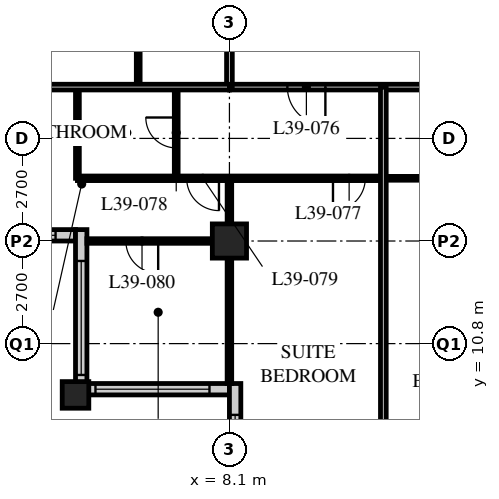
"""IFC4 building model, lengths in metres.
Left out: names, types, materials, properties, quantities, classifications, styles, units other than length and angle.
Written with IfcOpenShell. Run it as: python <this file> out.ifc"""

import sys

from ifc_helpers import new_model, si_unit, direction, frame, frame_2d, origin, origin_2d, place, context, subcontext, project, spatial, rectangle, hollow_rectangle, extrude, element, fill, save


model = new_model("IFC4")
c1 = context("Model", 3, precision=1e-05, world=origin(), true_north=direction((0.0, 1.0)))
c2 = subcontext(c1, "Body", "Model", "MODEL_VIEW")
j1 = project(units=[si_unit("LENGTHUNIT", "METRE"), si_unit("PLANEANGLEUNIT", "RADIAN")], contexts=[c1])
p1 = place(None, origin())
s1 = spatial("IfcSite", under=j1, at=p1, CompositionType="ELEMENT")
p2 = place(p1, origin())
s2 = spatial("IfcBuilding", under=s1, at=p2, CompositionType="ELEMENT")
p3 = place(p2, frame((0.0, 0.0, 151.0)))
s3 = spatial("IfcBuildingStorey", under=s2, at=p3, CompositionType="ELEMENT", Elevation=151.0)
p4 = place(p3, frame((4.05, 9.45, 0.0), z_axis=(0.0, 0.0, 1.0), x_axis=(1.0, 0.0, 0.0)))
e1 = element("IfcColumn", 1, at=p4, inside=s3, PredefinedType="COLUMN", context=c2, shape_type="SweptSolid", body=[
    extrude(hollow_rectangle(XDim=0.7, YDim=0.7, WallThickness=0.07, at=origin_2d()), origin(), (0.0, 0.0, 1.0), 3.4),
])
p5 = place(p3, frame((8.1, 13.5, 0.0), z_axis=(0.0, 0.0, 1.0), x_axis=(1.0, 0.0, 0.0)))
e2 = element("IfcColumn", 2, at=p5, inside=s3, PredefinedType="COLUMN", context=c2, shape_type="SweptSolid", body=[
    extrude(hollow_rectangle(XDim=0.9, YDim=0.9, WallThickness=0.1, at=origin_2d()), origin(), (0.0, 0.0, 1.0), 3.4),
])
p6 = place(p3, frame((0.3, 13.65, 0.0), z_axis=(0.0, 0.0, 1.0), x_axis=(1.0, 0.0, 0.0)))
e3 = element("IfcWall", 3, at=p6, inside=s3, PredefinedType="SOLIDWALL", context=c2, shape_type="SweptSolid", body=[
    extrude(rectangle(XDim=3.75, YDim=0.3, at=frame_2d((1.875, 0.0))), origin(), (0.0, 0.0, 1.0), 3.19),
])
p7 = place(p6, frame((0.225, 0.0, 0.9)))
e4 = element("IfcOpeningElement", 4, at=p7, cuts=e3, PredefinedType="OPENING", context=c2, shape_type="SweptSolid", body=[
    extrude(rectangle(XDim=3.0, YDim=1.4, at=frame_2d((1.5, 0.7))), frame((0.0, 0.16, 0.0), z_axis=(0.0, -1.0, 0.0), x_axis=(1.0, 0.0, 0.0)), (0.0, 0.0, 1.0), 0.32),
])
p8 = place(p3, frame((4.2, 13.8, 0.0), z_axis=(0.0, 0.0, 1.0), x_axis=(0.0, -1.0, 0.0)))
e5 = element("IfcWall", 5, at=p8, inside=s3, PredefinedType="SOLIDWALL", context=c2, shape_type="SweptSolid", body=[
    extrude(rectangle(XDim=4.35, YDim=0.3, at=frame_2d((2.175, 0.0))), origin(), (0.0, 0.0, 1.0), 3.19),
])
p9 = place(p8, frame((0.825, 0.0, 0.9)))
e6 = element("IfcOpeningElement", 6, at=p9, cuts=e5, PredefinedType="OPENING", context=c2, shape_type="SweptSolid", body=[
    extrude(rectangle(XDim=3.0, YDim=1.4, at=frame_2d((1.5, 0.7))), frame((0.0, 0.16, 0.0), z_axis=(0.0, -1.0, 0.0), x_axis=(1.0, 0.0, 0.0)), (0.0, 0.0, 1.0), 0.32),
])
p10 = place(p3, frame((4.35, 9.6, 0.0), z_axis=(0.0, 0.0, 1.0), x_axis=(1.0, 0.0, 0.0)))
e7 = element("IfcWall", 7, at=p10, inside=s3, PredefinedType="SOLIDWALL", context=c2, shape_type="SweptSolid", body=[
    extrude(rectangle(XDim=3.75, YDim=0.3, at=frame_2d((1.875, 0.0))), origin(), (0.0, 0.0, 1.0), 3.19),
])
p11 = place(p10, frame((0.225, 0.0, 0.9)))
e8 = element("IfcOpeningElement", 8, at=p11, cuts=e7, PredefinedType="OPENING", context=c2, shape_type="SweptSolid", body=[
    extrude(rectangle(XDim=3.0, YDim=1.4, at=frame_2d((1.5, 0.7))), frame((0.0, 0.16, 0.0), z_axis=(0.0, -1.0, 0.0), x_axis=(1.0, 0.0, 0.0)), (0.0, 0.0, 1.0), 0.32),
])
p12 = place(p3, frame((8.25, 9.75, 0.0), z_axis=(0.0, 0.0, 1.0), x_axis=(0.0, -1.0, 0.0)))
e9 = element("IfcWall", 9, at=p12, inside=s3, PredefinedType="SOLIDWALL", context=c2, shape_type="SweptSolid", body=[
    extrude(rectangle(XDim=4.35, YDim=0.3, at=frame_2d((2.175, 0.0))), origin(), (0.0, 0.0, 1.0), 3.19),
])
p13 = place(p12, frame((0.825, 0.0, 0.9)))
e10 = element("IfcOpeningElement", 10, at=p13, cuts=e9, PredefinedType="OPENING", context=c2, shape_type="SweptSolid", body=[
    extrude(rectangle(XDim=3.0, YDim=1.4, at=frame_2d((1.5, 0.7))), frame((0.0, 0.16, 0.0), z_axis=(0.0, -1.0, 0.0), x_axis=(1.0, 0.0, 0.0)), (0.0, 0.0, 1.0), 0.32),
])
p14 = place(p3, frame((8.1, 17.55, 0.0), z_axis=(0.0, 0.0, 1.0), x_axis=(1.0, 0.0, 0.0)))
e11 = element("IfcWall", 11, at=p14, inside=s3, PredefinedType="PARTITIONING", context=c2, shape_type="SweptSolid", body=[
    extrude(rectangle(XDim=40.5, YDim=0.15, at=frame_2d((20.25, 0.0))), origin(), (0.0, 0.0, 1.0), 3.19),
])
p15 = place(p14, frame((10.0, 0.0, 0.0)))
e12 = element("IfcOpeningElement", 12, at=p15, cuts=e11, PredefinedType="OPENING", context=c2, shape_type="SweptSolid", body=[
    extrude(rectangle(XDim=1.0, YDim=2.1, at=frame_2d((0.5, 1.05))), frame((0.0, 0.085, 0.0), z_axis=(0.0, -1.0, 0.0), x_axis=(1.0, 0.0, 0.0)), (0.0, 0.0, 1.0), 0.17),
])
p16 = place(p14, frame((22.15, 0.0, 0.0)))
e13 = element("IfcOpeningElement", 13, at=p16, cuts=e11, PredefinedType="OPENING", context=c2, shape_type="SweptSolid", body=[
    extrude(rectangle(XDim=1.0, YDim=2.1, at=frame_2d((0.5, 1.05))), frame((0.0, 0.085, 0.0), z_axis=(0.0, -1.0, 0.0), x_axis=(1.0, 0.0, 0.0)), (0.0, 0.0, 1.0), 0.17),
])
p17 = place(p14, frame((30.8, 0.0, 0.0)))
e14 = element("IfcOpeningElement", 14, at=p17, cuts=e11, PredefinedType="OPENING", context=c2, shape_type="SweptSolid", body=[
    extrude(rectangle(XDim=1.0, YDim=2.1, at=frame_2d((0.5, 1.05))), frame((0.0, 0.085, 0.0), z_axis=(0.0, -1.0, 0.0), x_axis=(1.0, 0.0, 0.0)), (0.0, 0.0, 1.0), 0.17),
])
p18 = place(p14, frame((34.85, 0.0, 0.0)))
e15 = element("IfcOpeningElement", 15, at=p18, cuts=e11, PredefinedType="OPENING", context=c2, shape_type="SweptSolid", body=[
    extrude(rectangle(XDim=1.0, YDim=2.1, at=frame_2d((0.5, 1.05))), frame((0.0, 0.085, 0.0), z_axis=(0.0, -1.0, 0.0), x_axis=(1.0, 0.0, 0.0)), (0.0, 0.0, 1.0), 0.17),
])
p19 = place(p14, frame((1.525, 0.0, 0.0)))
e16 = element("IfcOpeningElement", 16, at=p19, cuts=e11, PredefinedType="OPENING", context=c2, shape_type="SweptSolid", body=[
    extrude(rectangle(XDim=1.0, YDim=2.1, at=frame_2d((0.5, 1.05))), frame((0.0, 0.085, 0.0), z_axis=(0.0, -1.0, 0.0), x_axis=(1.0, 0.0, 0.0)), (0.0, 0.0, 1.0), 0.17),
])
p20 = place(p14, frame((37.975, 0.0, 0.0)))
e17 = element("IfcOpeningElement", 17, at=p20, cuts=e11, PredefinedType="OPENING", context=c2, shape_type="SweptSolid", body=[
    extrude(rectangle(XDim=1.0, YDim=2.1, at=frame_2d((0.5, 1.05))), frame((0.0, 0.085, 0.0), z_axis=(0.0, -1.0, 0.0), x_axis=(1.0, 0.0, 0.0)), (0.0, 0.0, 1.0), 0.17),
])
p21 = place(p3, frame((8.1, 17.55, 0.0), z_axis=(0.0, 0.0, 1.0), x_axis=(0.0, 1.0, 0.0)))
e18 = element("IfcWall", 18, at=p21, inside=s3, PredefinedType="PARTITIONING", context=c2, shape_type="SweptSolid", body=[
    extrude(rectangle(XDim=28.35, YDim=0.15, at=frame_2d((14.175, 0.0))), origin(), (0.0, 0.0, 1.0), 2.42),
])
p22 = place(p21, frame((5.95, 0.0, 0.0)))
e19 = element("IfcOpeningElement", 19, at=p22, cuts=e18, PredefinedType="OPENING", context=c2, shape_type="SweptSolid", body=[
    extrude(rectangle(XDim=1.0, YDim=2.1, at=frame_2d((0.5, 1.05))), frame((0.0, 0.085, 0.0), z_axis=(0.0, -1.0, 0.0), x_axis=(1.0, 0.0, 0.0)), (0.0, 0.0, 1.0), 0.17),
])
p23 = place(p21, frame((16.8, 0.0, 0.0)))
e20 = element("IfcOpeningElement", 20, at=p23, cuts=e18, PredefinedType="OPENING", context=c2, shape_type="SweptSolid", body=[
    extrude(rectangle(XDim=1.0, YDim=2.1, at=frame_2d((0.5, 1.05))), frame((0.0, 0.085, 0.0), z_axis=(0.0, -1.0, 0.0), x_axis=(1.0, 0.0, 0.0)), (0.0, 0.0, 1.0), 0.17),
])
p24 = place(p21, frame((22.7, 0.0, 0.0)))
e21 = element("IfcOpeningElement", 21, at=p24, cuts=e18, PredefinedType="OPENING", context=c2, shape_type="SweptSolid", body=[
    extrude(rectangle(XDim=1.0, YDim=2.1, at=frame_2d((0.5, 1.05))), frame((0.0, 0.085, 0.0), z_axis=(0.0, -1.0, 0.0), x_axis=(1.0, 0.0, 0.0)), (0.0, 0.0, 1.0), 0.17),
])
p25 = place(p21, frame((24.9, 0.0, 0.0)))
e22 = element("IfcOpeningElement", 22, at=p25, cuts=e18, PredefinedType="OPENING", context=c2, shape_type="SweptSolid", body=[
    extrude(rectangle(XDim=1.0, YDim=2.1, at=frame_2d((0.5, 1.05))), frame((0.0, 0.085, 0.0), z_axis=(0.0, -1.0, 0.0), x_axis=(1.0, 0.0, 0.0)), (0.0, 0.0, 1.0), 0.17),
])
p26 = place(p3, frame((12.15, 15.15, 0.0), z_axis=(0.0, 0.0, 1.0), x_axis=(1.0, 0.0, 0.0)))
e23 = element("IfcWall", 23, at=p26, inside=s3, PredefinedType="PARTITIONING", context=c2, shape_type="SweptSolid", body=[
    extrude(rectangle(XDim=2.6, YDim=0.1, at=frame_2d((1.3, 0.0))), origin(), (0.0, 0.0, 1.0), 3.19),
])
p27 = place(p3, frame((5.7, 17.55, 0.0), z_axis=(0.0, 0.0, 1.0), x_axis=(0.0, 1.0, 0.0)))
e24 = element("IfcWall", 24, at=p27, inside=s3, PredefinedType="PARTITIONING", context=c2, shape_type="SweptSolid", body=[
    extrude(rectangle(XDim=2.6, YDim=0.1, at=frame_2d((1.3, 0.0))), origin(), (0.0, 0.0, 1.0), 3.19),
])
p28 = place(p3, frame((6.7, 17.55, 0.0), z_axis=(0.0, 0.0, 1.0), x_axis=(0.0, -1.0, 0.0)))
e25 = element("IfcWall", 25, at=p28, inside=s3, PredefinedType="PARTITIONING", context=c2, shape_type="SweptSolid", body=[
    extrude(rectangle(XDim=2.4, YDim=0.1, at=frame_2d((1.2, 0.0))), origin(), (0.0, 0.0, 1.0), 3.19),
])
p29 = place(p28, frame((0.8, 0.0, 0.0)))
e26 = element("IfcOpeningElement", 26, at=p29, cuts=e25, PredefinedType="OPENING", context=c2, shape_type="SweptSolid", body=[
    extrude(rectangle(XDim=0.8, YDim=2.1, at=frame_2d((0.4, 1.05))), frame((0.0, 0.06, 0.0), z_axis=(0.0, -1.0, 0.0), x_axis=(1.0, 0.0, 0.0)), (0.0, 0.0, 1.0), 0.12),
])
p30 = place(p3, frame((4.1, 17.55, 0.0), z_axis=(0.0, 0.0, 1.0), x_axis=(0.0, -1.0, 0.0)))
e27 = element("IfcWall", 27, at=p30, inside=s3, PredefinedType="PARTITIONING", context=c2, shape_type="SweptSolid", body=[
    extrude(rectangle(XDim=2.4, YDim=0.1, at=frame_2d((1.2, 0.0))), origin(), (0.0, 0.0, 1.0), 3.19),
])
p31 = place(p3, frame((4.1, 15.15, 0.0), z_axis=(0.0, 0.0, 1.0), x_axis=(1.0, 0.0, 0.0)))
e28 = element("IfcWall", 28, at=p31, inside=s3, PredefinedType="PARTITIONING", context=c2, shape_type="SweptSolid", body=[
    extrude(rectangle(XDim=8.05, YDim=0.12, at=frame_2d((4.025, 0.0))), origin(), (0.0, 0.0, 1.0), 3.19),
])
p32 = place(p31, frame((6.725, 0.0, 0.0)))
e29 = element("IfcOpeningElement", 29, at=p32, cuts=e28, PredefinedType="OPENING", context=c2, shape_type="SweptSolid", body=[
    extrude(rectangle(XDim=0.85, YDim=2.1, at=frame_2d((0.425, 1.05))), frame((0.0, 0.07, 0.0), z_axis=(0.0, -1.0, 0.0), x_axis=(1.0, 0.0, 0.0)), (0.0, 0.0, 1.0), 0.14),
])
p33 = place(p31, frame((2.875, 0.0, 0.0)))
e30 = element("IfcOpeningElement", 30, at=p33, cuts=e28, PredefinedType="OPENING", context=c2, shape_type="SweptSolid", body=[
    extrude(rectangle(XDim=0.85, YDim=2.1, at=frame_2d((0.425, 1.05))), frame((0.0, 0.07, 0.0), z_axis=(0.0, -1.0, 0.0), x_axis=(1.0, 0.0, 0.0)), (0.0, 0.0, 1.0), 0.14),
])
p34 = place(p3, frame((8.1, 15.15, 0.0), z_axis=(0.0, 0.0, 1.0), x_axis=(0.0, -1.0, 0.0)))
e31 = element("IfcWall", 31, at=p34, inside=s3, PredefinedType="PARTITIONING", context=c2, shape_type="SweptSolid", body=[
    extrude(rectangle(XDim=5.4, YDim=0.12, at=frame_2d((2.7, 0.0))), origin(), (0.0, 0.0, 1.0), 2.42),
])
p35 = place(p3, frame((8.1, 13.5, 0.0), z_axis=(0.0, 0.0, 1.0), x_axis=(-1.0, 0.0, 0.0)))
e32 = element("IfcWall", 32, at=p35, inside=s3, PredefinedType="PARTITIONING", context=c2, shape_type="SweptSolid", body=[
    extrude(rectangle(XDim=3.75, YDim=0.12, at=frame_2d((1.875, 0.0))), origin(), (0.0, 0.0, 1.0), 2.42),
])
p36 = place(p35, frame((1.875, 0.0, 0.0)))
e33 = element("IfcOpeningElement", 33, at=p36, cuts=e32, PredefinedType="OPENING", context=c2, shape_type="SweptSolid", body=[
    extrude(rectangle(XDim=0.85, YDim=2.1, at=frame_2d((0.425, 1.05))), frame((0.0, 0.07, 0.0), z_axis=(0.0, -1.0, 0.0), x_axis=(1.0, 0.0, 0.0)), (0.0, 0.0, 1.0), 0.14),
])
p37 = place(p3, frame((0.3, 17.55, 0.0), z_axis=(0.0, 0.0, 1.0), x_axis=(1.0, 0.0, 0.0)))
e34 = element("IfcWall", 34, at=p37, inside=s3, PredefinedType="PARTITIONING", context=c2, shape_type="SweptSolid", body=[
    extrude(rectangle(XDim=7.8, YDim=0.15, at=frame_2d((3.9, 0.0))), origin(), (0.0, 0.0, 1.0), 3.19),
])
p38 = place(p3, frame((12.15, 17.55, 0.0), z_axis=(0.0, 0.0, 1.0), x_axis=(0.0, -1.0, 0.0)))
e35 = element("IfcWall", 35, at=p38, inside=s3, PredefinedType="PARTITIONING", context=c2, shape_type="SweptSolid", body=[
    extrude(rectangle(XDim=11.85, YDim=0.15, at=frame_2d((5.925, 0.0))), origin(), (0.0, 0.0, 1.0), 3.19),
])
p39 = place(p7, origin())
e36 = element("IfcWindow", 36, at=p39, inside=s3, PartitioningType="SINGLE_PANEL", PredefinedType="WINDOW", context=c2, shape_type="SweptSolid", body=[
    extrude(rectangle(XDim=3.0, YDim=1.4, at=frame_2d((1.5, 0.7))), frame((0.0, 0.03, 0.0), z_axis=(0.0, -1.0, 0.0), x_axis=(1.0, 0.0, 0.0)), (0.0, 0.0, 1.0), 0.06),
])
fill(e4, e36)
p40 = place(p9, origin())
e37 = element("IfcWindow", 37, at=p40, inside=s3, PartitioningType="SINGLE_PANEL", PredefinedType="WINDOW", context=c2, shape_type="SweptSolid", body=[
    extrude(rectangle(XDim=3.0, YDim=1.4, at=frame_2d((1.5, 0.7))), frame((0.0, 0.03, 0.0), z_axis=(0.0, -1.0, 0.0), x_axis=(1.0, 0.0, 0.0)), (0.0, 0.0, 1.0), 0.06),
])
fill(e6, e37)
p41 = place(p11, origin())
e38 = element("IfcWindow", 38, at=p41, inside=s3, PartitioningType="SINGLE_PANEL", PredefinedType="WINDOW", context=c2, shape_type="SweptSolid", body=[
    extrude(rectangle(XDim=3.0, YDim=1.4, at=frame_2d((1.5, 0.7))), frame((0.0, 0.03, 0.0), z_axis=(0.0, -1.0, 0.0), x_axis=(1.0, 0.0, 0.0)), (0.0, 0.0, 1.0), 0.06),
])
fill(e8, e38)
p42 = place(p13, origin())
e39 = element("IfcWindow", 39, at=p42, inside=s3, PartitioningType="SINGLE_PANEL", PredefinedType="WINDOW", context=c2, shape_type="SweptSolid", body=[
    extrude(rectangle(XDim=3.0, YDim=1.4, at=frame_2d((1.5, 0.7))), frame((0.0, 0.03, 0.0), z_axis=(0.0, -1.0, 0.0), x_axis=(1.0, 0.0, 0.0)), (0.0, 0.0, 1.0), 0.06),
])
fill(e10, e39)
p43 = place(p19, origin())
e40 = element("IfcDoor", 40, at=p43, inside=s3, OperationType="SINGLE_SWING_LEFT", PredefinedType="DOOR", context=c2, shape_type="SweptSolid", body=[
    extrude(rectangle(XDim=1.0, YDim=2.1, at=frame_2d((0.5, 1.05))), frame((0.0, 0.025, 0.0), z_axis=(0.0, -1.0, 0.0), x_axis=(1.0, 0.0, 0.0)), (0.0, 0.0, 1.0), 0.05),
])
fill(e16, e40)
p44 = place(p32, origin())
e41 = element("IfcDoor", 41, at=p44, inside=s3, OperationType="SINGLE_SWING_RIGHT", PredefinedType="DOOR", context=c2, shape_type="SweptSolid", body=[
    extrude(rectangle(XDim=0.85, YDim=2.1, at=frame_2d((0.425, 1.05))), frame((0.0, 0.025, 0.0), z_axis=(0.0, -1.0, 0.0), x_axis=(1.0, 0.0, 0.0)), (0.0, 0.0, 1.0), 0.05),
])
fill(e29, e41)
p45 = place(p29, origin())
e42 = element("IfcDoor", 42, at=p45, inside=s3, OperationType="SINGLE_SWING_RIGHT", PredefinedType="DOOR", context=c2, shape_type="SweptSolid", body=[
    extrude(rectangle(XDim=0.8, YDim=2.1, at=frame_2d((0.4, 1.05))), frame((0.0, 0.025, 0.0), z_axis=(0.0, -1.0, 0.0), x_axis=(1.0, 0.0, 0.0)), (0.0, 0.0, 1.0), 0.05),
])
fill(e26, e42)
p46 = place(p33, origin())
e43 = element("IfcDoor", 43, at=p46, inside=s3, OperationType="SINGLE_SWING_LEFT", PredefinedType="DOOR", context=c2, shape_type="SweptSolid", body=[
    extrude(rectangle(XDim=0.85, YDim=2.1, at=frame_2d((0.425, 1.05))), frame((0.0, 0.025, 0.0), z_axis=(0.0, -1.0, 0.0), x_axis=(1.0, 0.0, 0.0)), (0.0, 0.0, 1.0), 0.05),
])
fill(e30, e43)
p47 = place(p36, origin())
e44 = element("IfcDoor", 44, at=p47, inside=s3, OperationType="SINGLE_SWING_LEFT", PredefinedType="DOOR", context=c2, shape_type="SweptSolid", body=[
    extrude(rectangle(XDim=0.85, YDim=2.1, at=frame_2d((0.425, 1.05))), frame((0.0, 0.025, 0.0), z_axis=(0.0, -1.0, 0.0), x_axis=(1.0, 0.0, 0.0)), (0.0, 0.0, 1.0), 0.05),
])
fill(e33, e44)
save(model, sys.argv[1])
